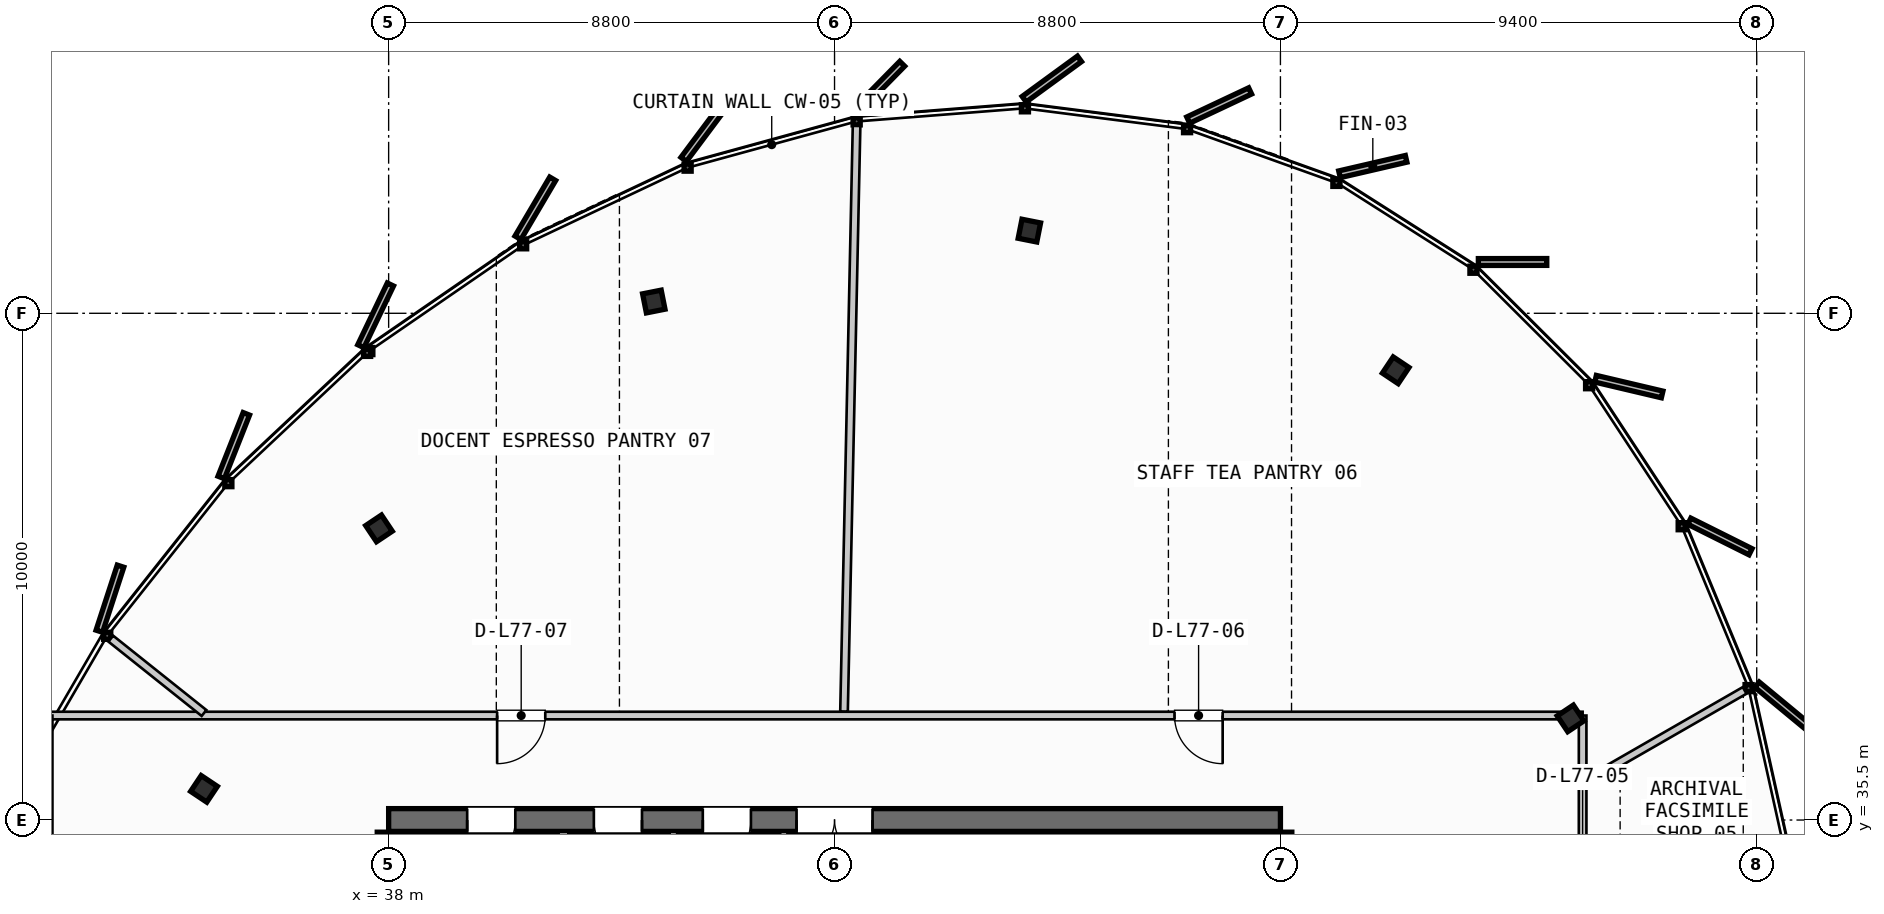
"""IFC4 building model, lengths in metres.
Left out: names, types, materials, properties, quantities, classifications, styles, units other than length and angle.
Written with IfcOpenShell. Run it as: python <this file> out.ifc"""

import sys

from ifc_helpers import new_model, si_unit, direction, frame, frame_2d, origin, origin_2d, place, context, subcontext, project, spatial, rectangle, i_section, extrude, source, transform, mapped, element, fill, save


model = new_model("IFC4")
c1 = context("Model", 3, precision=1e-05, world=origin(), true_north=direction((0.0, 1.0)))
c2 = subcontext(c1, "Body", "Model", "MODEL_VIEW")
j1 = project(units=[si_unit("LENGTHUNIT", "METRE"), si_unit("PLANEANGLEUNIT", "RADIAN")], contexts=[c1])
p1 = place(None, origin())
s1 = spatial("IfcSite", under=j1, at=p1, CompositionType="ELEMENT")
p2 = place(p1, origin())
s2 = spatial("IfcBuilding", under=s1, at=p2, CompositionType="ELEMENT")
p3 = place(p2, frame((0.0, 0.0, 290.5)))
s3 = spatial("IfcBuildingStorey", under=s2, at=p3, CompositionType="ELEMENT", Elevation=290.5)
p4 = place(p3, frame((55.6, 35.5, 0.0), z_axis=(0.0, 0.0, 1.0), x_axis=(-1.0, 0.0, 0.0)))
e1 = element("IfcWall", 1, at=p4, inside=s3, PredefinedType="SHEAR", context=c2, shape_type="SweptSolid", body=[
    extrude(rectangle(XDim=17.6, YDim=0.45, at=frame_2d((8.8, 0.0))), origin(), (0.0, 0.0, 1.0), 3.21),
])
p5 = place(p4, frame((8.05, 0.0, 0.0)))
e2 = element("IfcOpeningElement", 2, at=p5, cuts=e1, PredefinedType="OPENING", context=c2, shape_type="SweptSolid", body=[
    extrude(rectangle(XDim=1.5, YDim=2.2, at=frame_2d((0.75, 1.1))), frame((0.0, 0.235, 0.0), z_axis=(0.0, -1.0, 0.0), x_axis=(1.0, 0.0, 0.0)), (0.0, 0.0, 1.0), 0.47),
])
p6 = place(p4, frame((15.1, 0.0, 0.0)))
e3 = element("IfcOpeningElement", 3, at=p6, cuts=e1, PredefinedType="OPENING", context=c2, shape_type="SweptSolid", body=[
    extrude(rectangle(XDim=0.95, YDim=2.15, at=frame_2d((0.475, 1.075))), frame((0.0, 0.235, 0.0), z_axis=(0.0, -1.0, 0.0), x_axis=(1.0, 0.0, 0.0)), (0.0, 0.0, 1.0), 0.47),
])
p7 = place(p4, frame((12.6, 0.0, 0.0)))
e4 = element("IfcOpeningElement", 4, at=p7, cuts=e1, PredefinedType="OPENING", context=c2, shape_type="SweptSolid", body=[
    extrude(rectangle(XDim=0.95, YDim=2.15, at=frame_2d((0.475, 1.075))), frame((0.0, 0.235, 0.0), z_axis=(0.0, -1.0, 0.0), x_axis=(1.0, 0.0, 0.0)), (0.0, 0.0, 1.0), 0.47),
])
p8 = place(p4, frame((10.45, 0.0, 0.0)))
e5 = element("IfcOpeningElement", 5, at=p8, cuts=e1, PredefinedType="OPENING", context=c2, shape_type="SweptSolid", body=[
    extrude(rectangle(XDim=0.95, YDim=2.15, at=frame_2d((0.475, 1.075))), frame((0.0, 0.235, 0.0), z_axis=(0.0, -1.0, 0.0), x_axis=(1.0, 0.0, 0.0)), (0.0, 0.0, 1.0), 0.47),
])
p9 = place(p3, frame((38.0, 35.26, 0.0), z_axis=(0.0, 0.0, 1.0), x_axis=(0.0, -1.0, 0.0)))
e6 = element("IfcWall", 6, at=p9, inside=s3, PredefinedType="SHEAR", context=c2, shape_type="SweptSolid", body=[
    extrude(rectangle(XDim=14.92, YDim=0.45, at=frame_2d((7.46, 0.0))), origin(), (0.0, 0.0, 1.0), 3.21),
])
p10 = place(p9, frame((5.21, 0.0, 0.0)))
e7 = element("IfcOpeningElement", 7, at=p10, cuts=e6, PredefinedType="OPENING", context=c2, shape_type="SweptSolid", body=[
    extrude(rectangle(XDim=1.1, YDim=2.2, at=frame_2d((0.55, 1.1))), frame((0.0, 0.235, 0.0), z_axis=(0.0, -1.0, 0.0), x_axis=(1.0, 0.0, 0.0)), (0.0, 0.0, 1.0), 0.47),
])
p11 = place(p3, frame((55.6, 20.34, 0.0), z_axis=(0.0, 0.0, 1.0), x_axis=(0.0, 1.0, 0.0)))
e8 = element("IfcWall", 8, at=p11, inside=s3, PredefinedType="SHEAR", context=c2, shape_type="SweptSolid", body=[
    extrude(rectangle(XDim=14.92, YDim=0.45, at=frame_2d((7.46, 0.0))), origin(), (0.0, 0.0, 1.0), 3.21),
])
p12 = place(p11, frame((12.71, 0.0, 0.0)))
e9 = element("IfcOpeningElement", 9, at=p12, cuts=e8, PredefinedType="OPENING", context=c2, shape_type="SweptSolid", body=[
    extrude(rectangle(XDim=1.05, YDim=2.15, at=frame_2d((0.525, 1.075))), frame((0.0, 0.235, 0.0), z_axis=(0.0, -1.0, 0.0), x_axis=(1.0, 0.0, 0.0)), (0.0, 0.0, 1.0), 0.47),
])
p13 = place(p11, frame((8.61, 0.0, 0.0)))
e10 = element("IfcOpeningElement", 10, at=p13, cuts=e8, PredefinedType="OPENING", context=c2, shape_type="SweptSolid", body=[
    extrude(rectangle(XDim=1.1, YDim=2.2, at=frame_2d((0.55, 1.1))), frame((0.0, 0.235, 0.0), z_axis=(0.0, -1.0, 0.0), x_axis=(1.0, 0.0, 0.0)), (0.0, 0.0, 1.0), 0.47),
])
m1 = source(origin(), c2, "Body", "SweptSolid", [
    extrude(i_section(OverallWidth=0.374, OverallDepth=0.383, WebThickness=0.017, FlangeThickness=0.026, FilletRadius=0.015, at=origin_2d()), origin(), (0.0, 0.0, 1.0), 3.21),
])
for number, where, z_axis, x_axis in (
    (11, (61.326, 37.506, 0.0), (0.0, 0.0, 1.0), (0.831, 0.556, 0.0)),
    (12, (57.875, 44.375, 0.0), (0.0, 0.0, 1.0), (0.556, 0.831, 0.0)),
    (13, (50.645, 47.132, 0.0), (0.0, 0.0, 1.0), (0.195, 0.981, 0.0)),
    (14, (43.233, 45.732, 0.0), (0.0, 0.0, 1.0), (-0.195, 0.981, 0.0)),
    (15, (37.81, 41.255, 0.0), (0.0, 0.0, 1.0), (-0.556, 0.831, 0.0)),
    (16, (34.356, 36.115, 0.0), (0.0, 0.0, 1.0), (-0.831, 0.556, 0.0)),
):
    element("IfcColumn", number, at=place(p3, frame(where, z_axis=z_axis, x_axis=x_axis)), inside=s3, PredefinedType="COLUMN", context=c2, shape_type="MappedRepresentation", body=[
        mapped(m1, transform((0.0, 0.0, 0.0), scale=1.0)),
    ])
p14 = place(p3, frame((41.45, 31.85, 0.0), z_axis=(0.0, 0.0, 1.0), x_axis=(0.0, 1.0, 0.0)))
e17 = element("IfcWall", 17, at=p14, inside=s3, PredefinedType="PARTITIONING", context=c2, shape_type="SweptSolid", body=[
    extrude(rectangle(XDim=3.415, YDim=0.2, at=frame_2d((1.708, 0.0))), origin(), (0.0, 0.0, 1.0), 2.315),
])
p15 = place(p3, frame((45.8, 31.85, 0.0), z_axis=(0.0, 0.0, 1.0), x_axis=(0.0, 1.0, 0.0)))
e18 = element("IfcWall", 18, at=p15, inside=s3, PredefinedType="PARTITIONING", context=c2, shape_type="SweptSolid", body=[
    extrude(rectangle(XDim=3.415, YDim=0.15, at=frame_2d((1.708, 0.0))), origin(), (0.0, 0.0, 1.0), 2.315),
])
p16 = place(p3, frame((43.62, 31.85, 0.0), z_axis=(0.0, 0.0, 1.0), x_axis=(0.0, 1.0, 0.0)))
e19 = element("IfcWall", 19, at=p16, inside=s3, PredefinedType="PLUMBINGWALL", context=c2, shape_type="SweptSolid", body=[
    extrude(rectangle(XDim=3.415, YDim=0.15, at=frame_2d((1.708, 0.0))), origin(), (0.0, 0.0, 1.0), 2.315),
])
p17 = place(p3, frame((61.564, 18.269, 0.0), z_axis=(0.0, 0.0, 1.0), x_axis=(0.0, 1.0, 0.0)))
e20 = element("IfcWall", 20, at=p17, inside=s3, PredefinedType="PARTITIONING", context=c2, shape_type="SweptSolid", body=[
    extrude(rectangle(XDim=19.293, YDim=0.15, at=frame_2d((9.646, 0.0))), origin(), (0.0, 0.0, 1.0), 2.315),
])
p18 = place(p17, frame((4.312, 0.0, 0.0)))
e21 = element("IfcOpeningElement", 21, at=p18, cuts=e20, PredefinedType="OPENING", context=c2, shape_type="SweptSolid", body=[
    extrude(rectangle(XDim=0.95, YDim=2.15, at=frame_2d((0.475, 1.075))), frame((0.0, 0.085, 0.0), z_axis=(0.0, -1.0, 0.0), x_axis=(1.0, 0.0, 0.0)), (0.0, 0.0, 1.0), 0.17),
])
p19 = place(p17, frame((9.858, 0.0, 0.0)))
e22 = element("IfcOpeningElement", 22, at=p19, cuts=e20, PredefinedType="OPENING", context=c2, shape_type="SweptSolid", body=[
    extrude(rectangle(XDim=0.95, YDim=2.15, at=frame_2d((0.475, 1.075))), frame((0.0, 0.085, 0.0), z_axis=(0.0, -1.0, 0.0), x_axis=(1.0, 0.0, 0.0)), (0.0, 0.0, 1.0), 0.17),
])
p20 = place(p17, frame((15.95, 0.0, 0.0)))
e23 = element("IfcOpeningElement", 23, at=p20, cuts=e20, PredefinedType="OPENING", context=c2, shape_type="SweptSolid", body=[
    extrude(rectangle(XDim=0.95, YDim=2.15, at=frame_2d((0.475, 1.075))), frame((0.0, 0.085, 0.0), z_axis=(0.0, -1.0, 0.0), x_axis=(1.0, 0.0, 0.0)), (0.0, 0.0, 1.0), 0.17),
])
p21 = place(p3, frame((61.564, 37.562, 0.0), z_axis=(0.0, 0.0, 1.0), x_axis=(-1.0, 0.0, 0.0)))
e24 = element("IfcWall", 24, at=p21, inside=s3, PredefinedType="PARTITIONING", context=c2, shape_type="SweptSolid", body=[
    extrude(rectangle(XDim=30.274, YDim=0.15, at=frame_2d((15.137, 0.0))), origin(), (0.0, 0.0, 1.0), 2.315),
])
p22 = place(p21, frame((7.104, 0.0, 0.0)))
e25 = element("IfcOpeningElement", 25, at=p22, cuts=e24, PredefinedType="OPENING", context=c2, shape_type="SweptSolid", body=[
    extrude(rectangle(XDim=0.95, YDim=2.15, at=frame_2d((0.475, 1.075))), frame((0.0, 0.085, 0.0), z_axis=(0.0, -1.0, 0.0), x_axis=(1.0, 0.0, 0.0)), (0.0, 0.0, 1.0), 0.17),
])
p23 = place(p21, frame((20.473, 0.0, 0.0)))
e26 = element("IfcOpeningElement", 26, at=p23, cuts=e24, PredefinedType="OPENING", context=c2, shape_type="SweptSolid", body=[
    extrude(rectangle(XDim=0.95, YDim=2.15, at=frame_2d((0.475, 1.075))), frame((0.0, 0.085, 0.0), z_axis=(0.0, -1.0, 0.0), x_axis=(1.0, 0.0, 0.0)), (0.0, 0.0, 1.0), 0.17),
])
p24 = place(p3, frame((31.29, 37.562, 0.0), z_axis=(0.0, 0.0, 1.0), x_axis=(0.0, -1.0, 0.0)))
e27 = element("IfcWall", 27, at=p24, inside=s3, PredefinedType="PARTITIONING", context=c2, shape_type="SweptSolid", body=[
    extrude(rectangle(XDim=19.293, YDim=0.15, at=frame_2d((9.646, 0.0))), origin(), (0.0, 0.0, 1.0), 2.315),
])
p25 = place(p24, frame((4.403, 0.0, 0.0)))
e28 = element("IfcOpeningElement", 28, at=p25, cuts=e27, PredefinedType="OPENING", context=c2, shape_type="SweptSolid", body=[
    extrude(rectangle(XDim=0.95, YDim=2.15, at=frame_2d((0.475, 1.075))), frame((0.0, 0.085, 0.0), z_axis=(0.0, -1.0, 0.0), x_axis=(1.0, 0.0, 0.0)), (0.0, 0.0, 1.0), 0.17),
])
p26 = place(p24, frame((14.181, 0.0, 0.0)))
e29 = element("IfcOpeningElement", 29, at=p26, cuts=e27, PredefinedType="OPENING", context=c2, shape_type="SweptSolid", body=[
    extrude(rectangle(XDim=0.95, YDim=2.15, at=frame_2d((0.475, 1.075))), frame((0.0, 0.085, 0.0), z_axis=(0.0, -1.0, 0.0), x_axis=(1.0, 0.0, 0.0)), (0.0, 0.0, 1.0), 0.17),
])
p27 = place(p3, frame((61.633, 36.26, 0.0), z_axis=(0.0, 0.0, 1.0), x_axis=(0.867024695564, 0.498265167639, 0.0)))
e30 = element("IfcWall", 30, at=p27, inside=s3, PredefinedType="PARTITIONING", context=c2, shape_type="SweptSolid", body=[
    extrude(rectangle(XDim=3.608, YDim=0.15, at=frame_2d((1.804, 0.0))), origin(), (0.0, 0.0, 1.0), 2.315),
])
p28 = place(p3, frame((46.987, 37.642, 0.0), z_axis=(0.0, 0.0, 1.0), x_axis=(0.0214186766, 0.999770593833, 0.0)))
e31 = element("IfcWall", 31, at=p28, inside=s3, PredefinedType="PARTITIONING", context=c2, shape_type="SweptSolid", body=[
    extrude(rectangle(XDim=11.558, YDim=0.15, at=frame_2d((5.779, 0.0))), origin(), (0.0, 0.0, 1.0), 2.315),
])
p29 = place(p3, frame((34.356, 37.612, 0.0), z_axis=(0.0, 0.0, 1.0), x_axis=(-0.781768746215, 0.623568462513, 0.0)))
e32 = element("IfcWall", 32, at=p29, inside=s3, PredefinedType="PARTITIONING", context=c2, shape_type="SweptSolid", body=[
    extrude(rectangle(XDim=2.354, YDim=0.15, at=frame_2d((1.177, 0.0))), origin(), (0.0, 0.0, 1.0), 2.315),
])
m2 = source(origin(), c2, "Body", "SweptSolid", [
    extrude(rectangle(XDim=1.5, YDim=2.2, at=frame_2d((0.75, 1.1))), frame((0.0, 0.025, 0.0), z_axis=(0.0, -1.0, 0.0), x_axis=(1.0, 0.0, 0.0)), (0.0, 0.0, 1.0), 0.05),
])
p30 = place(p5, origin())
e33 = element("IfcDoor", 33, at=p30, inside=s3, OperationType="DOUBLE_DOOR_SINGLE_SWING", PredefinedType="DOOR", context=c2, shape_type="MappedRepresentation", body=[
    mapped(m2, transform((0.0, 0.0, 0.0), scale=1.0)),
])
fill(e2, e33)
m3 = source(origin(), c2, "Body", "SweptSolid", [
    extrude(rectangle(XDim=0.95, YDim=2.15, at=frame_2d((0.475, 1.075))), frame((0.0, 0.025, 0.0), z_axis=(0.0, -1.0, 0.0), x_axis=(1.0, 0.0, 0.0)), (0.0, 0.0, 1.0), 0.05),
])
p31 = place(p6, origin())
e34 = element("IfcDoor", 34, at=p31, inside=s3, OperationType="SINGLE_SWING_RIGHT", PredefinedType="DOOR", context=c2, shape_type="MappedRepresentation", body=[
    mapped(m3, transform((0.0, 0.0, 0.0), scale=1.0)),
])
fill(e3, e34)
p32 = place(p7, origin())
e35 = element("IfcDoor", 35, at=p32, inside=s3, OperationType="SINGLE_SWING_LEFT", PredefinedType="DOOR", context=c2, shape_type="MappedRepresentation", body=[
    mapped(m3, transform((0.0, 0.0, 0.0), scale=1.0)),
])
fill(e4, e35)
p33 = place(p8, origin())
e36 = element("IfcDoor", 36, at=p33, inside=s3, OperationType="SINGLE_SWING_RIGHT", PredefinedType="DOOR", context=c2, shape_type="MappedRepresentation", body=[
    mapped(m3, transform((0.0, 0.0, 0.0), scale=1.0)),
])
fill(e5, e36)
p34 = place(p22, origin())
e37 = element("IfcDoor", 37, at=p34, inside=s3, OperationType="SINGLE_SWING_LEFT", PredefinedType="DOOR", context=c2, shape_type="MappedRepresentation", body=[
    mapped(m3, transform((0.0, 0.0, 0.0), scale=1.0)),
])
fill(e25, e37)
p35 = place(p23, origin())
e38 = element("IfcDoor", 38, at=p35, inside=s3, OperationType="SINGLE_SWING_RIGHT", PredefinedType="DOOR", context=c2, shape_type="MappedRepresentation", body=[
    mapped(m3, transform((0.0, 0.0, 0.0), scale=1.0)),
])
fill(e26, e38)
save(model, sys.argv[1])
